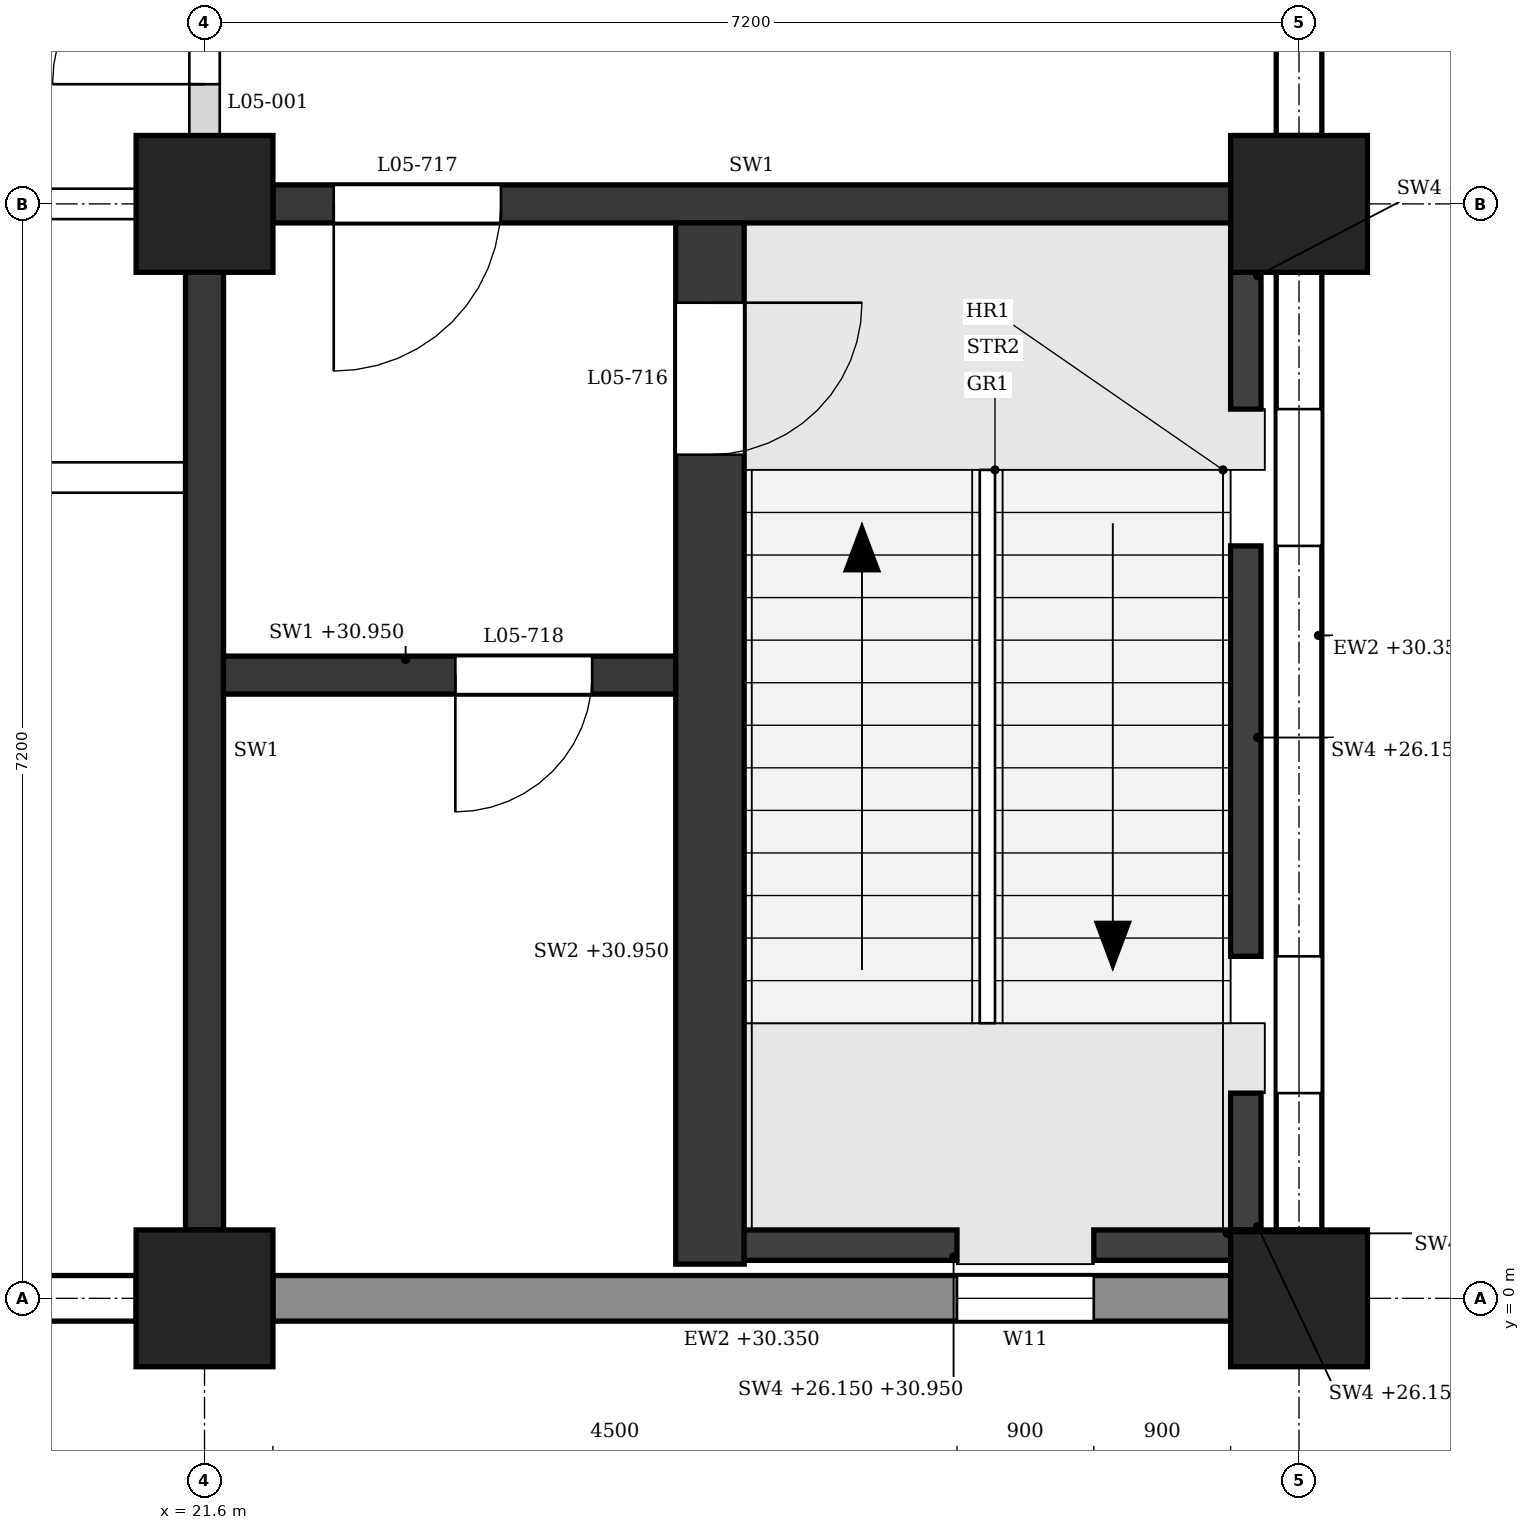
"""IFC4 building model, lengths in metres.
Left out: names, types, materials, properties, quantities, classifications, styles, units other than length and angle.
Written with IfcOpenShell. Run it as: python <this file> out.ifc"""

import sys

from ifc_helpers import new_model, si_unit, direction, frame, frame_2d, origin, origin_2d, place, context, subcontext, project, spatial, polyline, rectangle, outline, extrude, element, fill, save


model = new_model("IFC4")
c1 = context("Model", 3, precision=1e-05, world=origin(), true_north=direction((0.0, 1.0)))
c2 = subcontext(c1, "Body", "Model", "MODEL_VIEW")
j1 = project(units=[si_unit("LENGTHUNIT", "METRE"), si_unit("PLANEANGLEUNIT", "RADIAN")], contexts=[c1])
p1 = place(None, origin())
s1 = spatial("IfcSite", under=j1, at=p1, CompositionType="ELEMENT")
p2 = place(p1, origin())
s2 = spatial("IfcBuilding", under=s1, at=p2, CompositionType="ELEMENT")
p3 = place(p2, frame((0.0, 0.0, 26.4)))
s3 = spatial("IfcBuildingStorey", under=s2, at=p3, CompositionType="ELEMENT", Elevation=26.4)
for number, where, z_axis, x_axis in (
    (1, (21.6, 0.0, 0.0), (0.0, 0.0, 1.0), (1.0, 0.0, 0.0)),
    (2, (21.6, 7.2, 0.0), (0.0, 0.0, 1.0), (1.0, 0.0, 0.0)),
    (3, (28.8, 0.0, 0.0), (0.0, 0.0, 1.0), (1.0, 0.0, 0.0)),
    (4, (28.8, 7.2, 0.0), (0.0, 0.0, 1.0), (1.0, 0.0, 0.0)),
):
    element("IfcColumn", number, at=place(p3, frame(where, z_axis=z_axis, x_axis=x_axis)), inside=s3, PredefinedType="COLUMN", context=c2, shape_type="SweptSolid", body=[
        extrude(rectangle(XDim=0.9, YDim=0.9, at=origin_2d()), origin(), (0.0, 0.0, 1.0), 4.8),
    ])
p4 = place(p3, frame((14.85, 0.0, 0.0), z_axis=(0.0, 0.0, 1.0), x_axis=(1.0, 0.0, 0.0)))
e5 = element("IfcWall", 5, at=p4, inside=s3, PredefinedType="STANDARD", context=c2, shape_type="SweptSolid", body=[
    extrude(rectangle(XDim=6.3, YDim=0.3, at=frame_2d((3.15, 0.0))), origin(), (0.0, 0.0, 1.0), 3.95),
])
p5 = place(p4, frame((0.6, 0.0, 0.9)))
e6 = element("IfcOpeningElement", 6, at=p5, cuts=e5, PredefinedType="OPENING", context=c2, shape_type="SweptSolid", body=[
    extrude(outline(polyline([(0.0, 0.0), (1.5, 0.0), (1.5, 1.75), (0.75, 2.5), (0.0, 1.75), (0.0, 0.0)])), frame((0.0, 0.16, 0.0), z_axis=(0.0, -1.0, 0.0), x_axis=(1.0, 0.0, 0.0)), (0.0, 0.0, 1.0), 0.32),
])
p6 = place(p4, frame((4.2, 0.0, 0.9)))
e7 = element("IfcOpeningElement", 7, at=p6, cuts=e5, PredefinedType="OPENING", context=c2, shape_type="SweptSolid", body=[
    extrude(outline(polyline([(0.0, 0.0), (1.5, 0.0), (1.5, 1.75), (0.75, 2.5), (0.0, 1.75), (0.0, 0.0)])), frame((0.0, 0.16, 0.0), z_axis=(0.0, -1.0, 0.0), x_axis=(1.0, 0.0, 0.0)), (0.0, 0.0, 1.0), 0.32),
])
p7 = place(p3, frame((22.05, 0.0, 0.0), z_axis=(0.0, 0.0, 1.0), x_axis=(1.0, 0.0, 0.0)))
e8 = element("IfcWall", 8, at=p7, inside=s3, PredefinedType="STANDARD", context=c2, shape_type="SweptSolid", body=[
    extrude(rectangle(XDim=6.3, YDim=0.3, at=frame_2d((3.15, 0.0))), origin(), (0.0, 0.0, 1.0), 3.95),
])
p8 = place(p7, frame((4.5, 0.0, 0.9)))
e9 = element("IfcOpeningElement", 9, at=p8, cuts=e8, PredefinedType="OPENING", context=c2, shape_type="SweptSolid", body=[
    extrude(outline(polyline([(0.0, 0.0), (0.9, 0.0), (0.9, 2.05), (0.45, 2.5), (0.0, 2.05), (0.0, 0.0)])), frame((0.0, 0.16, 0.0), z_axis=(0.0, -1.0, 0.0), x_axis=(1.0, 0.0, 0.0)), (0.0, 0.0, 1.0), 0.32),
])
p9 = place(p3, frame((28.8, 0.45, 0.0), z_axis=(0.0, 0.0, 1.0), x_axis=(0.0, 1.0, 0.0)))
e10 = element("IfcWall", 10, at=p9, inside=s3, PredefinedType="STANDARD", context=c2, shape_type="SweptSolid", body=[
    extrude(rectangle(XDim=6.3, YDim=0.3, at=frame_2d((3.15, 0.0))), origin(), (0.0, 0.0, 1.0), 3.95),
])
p10 = place(p9, frame((0.9, 0.0, 0.9)))
e11 = element("IfcOpeningElement", 11, at=p10, cuts=e10, PredefinedType="OPENING", context=c2, shape_type="SweptSolid", body=[
    extrude(outline(polyline([(0.0, 0.0), (0.9, 0.0), (0.9, 2.05), (0.45, 2.5), (0.0, 2.05), (0.0, 0.0)])), frame((0.0, 0.16, 0.0), z_axis=(0.0, -1.0, 0.0), x_axis=(1.0, 0.0, 0.0)), (0.0, 0.0, 1.0), 0.32),
])
p11 = place(p9, frame((4.5, 0.0, 0.9)))
e12 = element("IfcOpeningElement", 12, at=p11, cuts=e10, PredefinedType="OPENING", context=c2, shape_type="SweptSolid", body=[
    extrude(outline(polyline([(0.0, 0.0), (0.9, 0.0), (0.9, 2.05), (0.45, 2.5), (0.0, 2.05), (0.0, 0.0)])), frame((0.0, 0.16, 0.0), z_axis=(0.0, -1.0, 0.0), x_axis=(1.0, 0.0, 0.0)), (0.0, 0.0, 1.0), 0.32),
])
p12 = place(p3, frame((28.8, 7.65, 0.0), z_axis=(0.0, 0.0, 1.0), x_axis=(0.0, 1.0, 0.0)))
e13 = element("IfcWall", 13, at=p12, inside=s3, PredefinedType="STANDARD", context=c2, shape_type="SweptSolid", body=[
    extrude(rectangle(XDim=6.3, YDim=0.3, at=frame_2d((3.15, 0.0))), origin(), (0.0, 0.0, 1.0), 3.95),
])
p13 = place(p12, frame((0.6, 0.0, 0.9)))
e14 = element("IfcOpeningElement", 14, at=p13, cuts=e13, PredefinedType="OPENING", context=c2, shape_type="SweptSolid", body=[
    extrude(outline(polyline([(0.0, 0.0), (1.5, 0.0), (1.5, 1.75), (0.75, 2.5), (0.0, 1.75), (0.0, 0.0)])), frame((0.0, 0.16, 0.0), z_axis=(0.0, -1.0, 0.0), x_axis=(1.0, 0.0, 0.0)), (0.0, 0.0, 1.0), 0.32),
])
p14 = place(p3, frame((22.05, 7.2, 0.0), z_axis=(0.0, 0.0, 1.0), x_axis=(1.0, 0.0, 0.0)))
e15 = element("IfcWall", 15, at=p14, inside=s3, PredefinedType="SHEAR", context=c2, shape_type="SweptSolid", body=[
    extrude(rectangle(XDim=6.3, YDim=0.25, at=frame_2d((3.15, 0.0))), origin(), (0.0, 0.0, 1.0), 3.8),
])
p15 = place(p14, frame((0.4, 0.0, 0.0)))
e16 = element("IfcOpeningElement", 16, at=p15, cuts=e15, PredefinedType="OPENING", context=c2, shape_type="SweptSolid", body=[
    extrude(rectangle(XDim=1.1, YDim=2.1, at=frame_2d((0.55, 1.05))), frame((0.0, 0.135, 0.0), z_axis=(0.0, -1.0, 0.0), x_axis=(1.0, 0.0, 0.0)), (0.0, 0.0, 1.0), 0.27),
])
p16 = place(p3, frame((21.6, 0.45, 0.0), z_axis=(0.0, 0.0, 1.0), x_axis=(0.0, 1.0, 0.0)))
e17 = element("IfcWall", 17, at=p16, inside=s3, PredefinedType="SHEAR", context=c2, shape_type="SweptSolid", body=[
    extrude(rectangle(XDim=6.3, YDim=0.25, at=frame_2d((3.15, 0.0))), origin(), (0.0, 0.0, 1.0), 3.8),
])
p17 = place(p3, frame((28.45, 0.45, -0.25), z_axis=(0.0, 0.0, 1.0), x_axis=(0.0, 1.0, 0.0)))
e18 = element("IfcWall", 18, at=p17, inside=s3, PredefinedType="SHEAR", context=c2, shape_type="SweptSolid", body=[
    extrude(rectangle(XDim=0.9, YDim=0.2, at=frame_2d((0.45, 0.0))), origin(), (0.0, 0.0, 1.0), 4.8),
])
p18 = place(p3, frame((28.45, 2.25, -0.25), z_axis=(0.0, 0.0, 1.0), x_axis=(0.0, 1.0, 0.0)))
e19 = element("IfcWall", 19, at=p18, inside=s3, PredefinedType="SHEAR", context=c2, shape_type="SweptSolid", body=[
    extrude(rectangle(XDim=2.7, YDim=0.2, at=frame_2d((1.35, 0.0))), origin(), (0.0, 0.0, 1.0), 4.8),
])
p19 = place(p3, frame((28.45, 5.85, -0.25), z_axis=(0.0, 0.0, 1.0), x_axis=(0.0, 1.0, 0.0)))
e20 = element("IfcWall", 20, at=p19, inside=s3, PredefinedType="SHEAR", context=c2, shape_type="SweptSolid", body=[
    extrude(rectangle(XDim=0.9, YDim=0.2, at=frame_2d((0.45, 0.0))), origin(), (0.0, 0.0, 1.0), 4.8),
])
p20 = place(p3, frame((25.15, 0.35, -0.25), z_axis=(0.0, 0.0, 1.0), x_axis=(1.0, 0.0, 0.0)))
e21 = element("IfcWall", 21, at=p20, inside=s3, PredefinedType="SHEAR", context=c2, shape_type="SweptSolid", body=[
    extrude(rectangle(XDim=1.4, YDim=0.2, at=frame_2d((0.7, 0.0))), origin(), (0.0, 0.0, 1.0), 4.8),
])
p21 = place(p3, frame((27.45, 0.35, -0.25), z_axis=(0.0, 0.0, 1.0), x_axis=(1.0, 0.0, 0.0)))
e22 = element("IfcWall", 22, at=p21, inside=s3, PredefinedType="SHEAR", context=c2, shape_type="SweptSolid", body=[
    extrude(rectangle(XDim=0.9, YDim=0.2, at=frame_2d((0.45, 0.0))), origin(), (0.0, 0.0, 1.0), 4.8),
])
p22 = place(p3, frame((24.925, 0.225, 0.0), z_axis=(0.0, 0.0, 1.0), x_axis=(0.0, 1.0, 0.0)))
e23 = element("IfcWall", 23, at=p22, inside=s3, PredefinedType="SHEAR", context=c2, shape_type="SweptSolid", body=[
    extrude(rectangle(XDim=6.85, YDim=0.45, at=frame_2d((3.425, 0.0))), origin(), (0.0, 0.0, 1.0), 4.55),
])
p23 = place(p22, frame((5.325, 0.0, 0.0)))
e24 = element("IfcOpeningElement", 24, at=p23, cuts=e23, PredefinedType="OPENING", context=c2, shape_type="SweptSolid", body=[
    extrude(rectangle(XDim=1.0, YDim=2.1, at=frame_2d((0.5, 1.05))), frame((0.0, 0.235, 0.0), z_axis=(0.0, -1.0, 0.0), x_axis=(1.0, 0.0, 0.0)), (0.0, 0.0, 1.0), 0.47),
])
p24 = place(p3, frame((21.725, 4.1, 0.0), z_axis=(0.0, 0.0, 1.0), x_axis=(1.0, 0.0, 0.0)))
e25 = element("IfcWall", 25, at=p24, inside=s3, PredefinedType="SHEAR", context=c2, shape_type="SweptSolid", body=[
    extrude(rectangle(XDim=2.975, YDim=0.25, at=frame_2d((1.487, 0.0))), origin(), (0.0, 0.0, 1.0), 4.55),
])
p25 = place(p24, frame((1.525, 0.0, 0.0)))
e26 = element("IfcOpeningElement", 26, at=p25, cuts=e25, PredefinedType="OPENING", context=c2, shape_type="SweptSolid", body=[
    extrude(rectangle(XDim=0.9, YDim=2.1, at=frame_2d((0.45, 1.05))), frame((0.0, 0.135, 0.0), z_axis=(0.0, -1.0, 0.0), x_axis=(1.0, 0.0, 0.0)), (0.0, 0.0, 1.0), 0.27),
])
p26 = place(p3, frame((7.325, 5.4, 0.0), z_axis=(0.0, 0.0, 1.0), x_axis=(1.0, 0.0, 0.0)))
e27 = element("IfcWall", 27, at=p26, inside=s3, PredefinedType="PARTITIONING", context=c2, shape_type="SweptSolid", body=[
    extrude(outline(polyline([(0.0, 0.0), (14.15, 0.0), (14.15, 3.8), (14.025, 3.8), (14.025, 4.55), (7.325, 4.55), (7.325, 3.8), (6.825, 3.8), (6.825, 4.55), (0.125, 4.55), (0.125, 3.8), (0.0, 3.8), (0.0, 0.0)])), frame((0.0, 0.1, 0.0), z_axis=(0.0, -1.0, 0.0), x_axis=(1.0, 0.0, 0.0)), (0.0, 0.0, 1.0), 0.2),
])
p27 = place(p26, frame((1.238, 0.0, 0.0)))
e28 = element("IfcOpeningElement", 28, at=p27, cuts=e27, PredefinedType="OPENING", context=c2, shape_type="SweptSolid", body=[
    extrude(rectangle(XDim=1.0, YDim=2.1, at=frame_2d((0.5, 1.05))), frame((0.0, 0.11, 0.0), z_axis=(0.0, -1.0, 0.0), x_axis=(1.0, 0.0, 0.0)), (0.0, 0.0, 1.0), 0.22),
])
p28 = place(p26, frame((4.775, 0.0, 0.0)))
e29 = element("IfcOpeningElement", 29, at=p28, cuts=e27, PredefinedType="OPENING", context=c2, shape_type="SweptSolid", body=[
    extrude(rectangle(XDim=1.0, YDim=2.1, at=frame_2d((0.5, 1.05))), frame((0.0, 0.11, 0.0), z_axis=(0.0, -1.0, 0.0), x_axis=(1.0, 0.0, 0.0)), (0.0, 0.0, 1.0), 0.22),
])
p29 = place(p26, frame((8.375, 0.0, 0.0)))
e30 = element("IfcOpeningElement", 30, at=p29, cuts=e27, PredefinedType="OPENING", context=c2, shape_type="SweptSolid", body=[
    extrude(rectangle(XDim=1.0, YDim=2.1, at=frame_2d((0.5, 1.05))), frame((0.0, 0.11, 0.0), z_axis=(0.0, -1.0, 0.0), x_axis=(1.0, 0.0, 0.0)), (0.0, 0.0, 1.0), 0.22),
])
p30 = place(p26, frame((11.913, 0.0, 0.0)))
e31 = element("IfcOpeningElement", 31, at=p30, cuts=e27, PredefinedType="OPENING", context=c2, shape_type="SweptSolid", body=[
    extrude(rectangle(XDim=1.0, YDim=2.1, at=frame_2d((0.5, 1.05))), frame((0.0, 0.11, 0.0), z_axis=(0.0, -1.0, 0.0), x_axis=(1.0, 0.0, 0.0)), (0.0, 0.0, 1.0), 0.22),
])
p31 = place(p3, frame((14.85, 7.2, 0.0), z_axis=(0.0, 0.0, 1.0), x_axis=(1.0, 0.0, 0.0)))
e32 = element("IfcWall", 32, at=p31, inside=s3, PredefinedType="PARTITIONING", context=c2, shape_type="SweptSolid", body=[
    extrude(rectangle(XDim=6.3, YDim=0.2, at=frame_2d((3.15, 0.0))), origin(), (0.0, 0.0, 1.0), 3.8),
])
p32 = place(p31, frame((4.225, 0.0, 0.0)))
e33 = element("IfcOpeningElement", 33, at=p32, cuts=e32, PredefinedType="OPENING", context=c2, shape_type="SweptSolid", body=[
    extrude(rectangle(XDim=1.0, YDim=2.1, at=frame_2d((0.5, 1.05))), frame((0.0, 0.11, 0.0), z_axis=(0.0, -1.0, 0.0), x_axis=(1.0, 0.0, 0.0)), (0.0, 0.0, 1.0), 0.22),
])
p33 = place(p3, frame((21.6, 7.65, 0.0), z_axis=(0.0, 0.0, 1.0), x_axis=(0.0, 1.0, 0.0)))
e34 = element("IfcWall", 34, at=p33, inside=s3, PredefinedType="PARTITIONING", context=c2, shape_type="SweptSolid", body=[
    extrude(rectangle(XDim=2.675, YDim=0.2, at=frame_2d((1.337, 0.0))), origin(), (0.0, 0.0, 1.0), 3.8),
])
p34 = place(p33, frame((0.337, 0.0, 0.0)))
e35 = element("IfcOpeningElement", 35, at=p34, cuts=e34, PredefinedType="OPENING", context=c2, shape_type="SweptSolid", body=[
    extrude(rectangle(XDim=2.0, YDim=2.4, at=frame_2d((1.0, 1.2))), frame((0.0, 0.11, 0.0), z_axis=(0.0, -1.0, 0.0), x_axis=(1.0, 0.0, 0.0)), (0.0, 0.0, 1.0), 0.22),
])
p35 = place(p10, origin())
e36 = element("IfcWindow", 36, at=p35, inside=s3, PartitioningType="SINGLE_PANEL", PredefinedType="WINDOW", context=c2, shape_type="SweptSolid", body=[
    extrude(outline(polyline([(0.0, 0.0), (0.9, 0.0), (0.9, 2.05), (0.45, 2.5), (0.0, 2.05), (0.0, 0.0)])), frame((0.0, 0.03, 0.0), z_axis=(0.0, -1.0, 0.0), x_axis=(1.0, 0.0, 0.0)), (0.0, 0.0, 1.0), 0.06),
])
fill(e11, e36)
p36 = place(p11, origin())
e37 = element("IfcWindow", 37, at=p36, inside=s3, PartitioningType="SINGLE_PANEL", PredefinedType="WINDOW", context=c2, shape_type="SweptSolid", body=[
    extrude(outline(polyline([(0.0, 0.0), (0.9, 0.0), (0.9, 2.05), (0.45, 2.5), (0.0, 2.05), (0.0, 0.0)])), frame((0.0, 0.03, 0.0), z_axis=(0.0, -1.0, 0.0), x_axis=(1.0, 0.0, 0.0)), (0.0, 0.0, 1.0), 0.06),
])
fill(e12, e37)
p37 = place(p8, origin())
e38 = element("IfcWindow", 38, at=p37, inside=s3, PartitioningType="SINGLE_PANEL", PredefinedType="WINDOW", context=c2, shape_type="SweptSolid", body=[
    extrude(outline(polyline([(0.0, 0.0), (0.9, 0.0), (0.9, 2.05), (0.45, 2.5), (0.0, 2.05), (0.0, 0.0)])), frame((0.0, 0.03, 0.0), z_axis=(0.0, -1.0, 0.0), x_axis=(1.0, 0.0, 0.0)), (0.0, 0.0, 1.0), 0.06),
])
fill(e9, e38)
p38 = place(p23, frame((1.0, 0.0, 0.0), z_axis=(0.0, 0.0, 1.0), x_axis=(-1.0, 0.0, 0.0)))
e39 = element("IfcDoor", 39, at=p38, inside=s3, OperationType="SINGLE_SWING_LEFT", PredefinedType="DOOR", context=c2, shape_type="SweptSolid", body=[
    extrude(rectangle(XDim=1.0, YDim=2.1, at=frame_2d((0.5, 1.05))), frame((0.0, 0.025, 0.0), z_axis=(0.0, -1.0, 0.0), x_axis=(1.0, 0.0, 0.0)), (0.0, 0.0, 1.0), 0.05),
])
fill(e24, e39)
p39 = place(p15, frame((1.1, 0.0, 0.0), z_axis=(0.0, 0.0, 1.0), x_axis=(-1.0, 0.0, 0.0)))
e40 = element("IfcDoor", 40, at=p39, inside=s3, OperationType="SINGLE_SWING_RIGHT", PredefinedType="DOOR", context=c2, shape_type="SweptSolid", body=[
    extrude(rectangle(XDim=1.1, YDim=2.1, at=frame_2d((0.55, 1.05))), frame((0.0, 0.025, 0.0), z_axis=(0.0, -1.0, 0.0), x_axis=(1.0, 0.0, 0.0)), (0.0, 0.0, 1.0), 0.05),
])
fill(e16, e40)
p40 = place(p25, frame((0.9, 0.0, 0.0), z_axis=(0.0, 0.0, 1.0), x_axis=(-1.0, 0.0, 0.0)))
e41 = element("IfcDoor", 41, at=p40, inside=s3, OperationType="SINGLE_SWING_RIGHT", PredefinedType="DOOR", context=c2, shape_type="SweptSolid", body=[
    extrude(rectangle(XDim=0.9, YDim=2.1, at=frame_2d((0.45, 1.05))), frame((0.0, 0.025, 0.0), z_axis=(0.0, -1.0, 0.0), x_axis=(1.0, 0.0, 0.0)), (0.0, 0.0, 1.0), 0.05),
])
fill(e26, e41)
p41 = place(p34, origin())
e42 = element("IfcDoor", 42, at=p41, inside=s3, OperationType="DOUBLE_DOOR_SINGLE_SWING", PredefinedType="DOOR", context=c2, shape_type="SweptSolid", body=[
    extrude(rectangle(XDim=2.0, YDim=2.4, at=frame_2d((1.0, 1.2))), frame((0.0, 0.025, 0.0), z_axis=(0.0, -1.0, 0.0), x_axis=(1.0, 0.0, 0.0)), (0.0, 0.0, 1.0), 0.05),
])
fill(e35, e42)
save(model, sys.argv[1])
